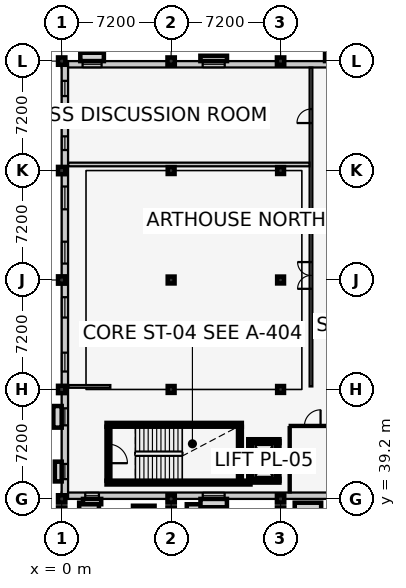
"""IFC4 building model, lengths in metres.
Left out: names, types, materials, properties, quantities, classifications, styles, units other than length and angle.
Written with IfcOpenShell. Run it as: python <this file> out.ifc"""

import sys

from ifc_helpers import new_model, si_unit, direction, frame, frame_2d, origin, origin_2d, place, context, subcontext, project, spatial, rectangle, extrude, element, fill, save


model = new_model("IFC4")
c1 = context("Model", 3, precision=1e-05, world=origin(), true_north=direction((0.0, 1.0)))
c2 = subcontext(c1, "Body", "Model", "MODEL_VIEW")
j1 = project(units=[si_unit("LENGTHUNIT", "METRE"), si_unit("PLANEANGLEUNIT", "RADIAN")], contexts=[c1])
p1 = place(None, origin())
s1 = spatial("IfcSite", under=j1, at=p1, CompositionType="ELEMENT")
p2 = place(p1, origin())
s2 = spatial("IfcBuilding", under=s1, at=p2, CompositionType="ELEMENT")
p3 = place(p2, frame((0.0, 0.0, 9.6)))
s3 = spatial("IfcBuildingStorey", under=s2, at=p3, CompositionType="ELEMENT", Elevation=9.6)
for number, where, z_axis, x_axis in (
    (1, (0.0, 38.4, 0.0), (0.0, 0.0, 1.0), (1.0, 0.0, 0.0)),
    (2, (7.2, 38.4, 0.0), (0.0, 0.0, 1.0), (1.0, 0.0, 0.0)),
    (3, (14.4, 38.4, 0.0), (0.0, 0.0, 1.0), (1.0, 0.0, 0.0)),
    (4, (0.0, 39.2, 0.0), (0.0, 0.0, 1.0), (1.0, 0.0, 0.0)),
    (5, (0.0, 46.4, 0.0), (0.0, 0.0, 1.0), (1.0, 0.0, 0.0)),
    (6, (0.0, 53.6, 0.0), (0.0, 0.0, 1.0), (1.0, 0.0, 0.0)),
    (7, (0.0, 60.8, 0.0), (0.0, 0.0, 1.0), (1.0, 0.0, 0.0)),
    (8, (0.0, 68.0, 0.0), (0.0, 0.0, 1.0), (1.0, 0.0, 0.0)),
    (9, (7.2, 39.2, 0.0), (0.0, 0.0, 1.0), (1.0, 0.0, 0.0)),
):
    element("IfcColumn", number, at=place(p3, frame(where, z_axis=z_axis, x_axis=x_axis)), inside=s3, PredefinedType="COLUMN", context=c2, shape_type="SweptSolid", body=[
        extrude(rectangle(XDim=0.48, YDim=0.48, at=origin_2d()), origin(), (0.0, 0.0, 1.0), 4.2),
    ])
for number, where, z_axis, x_axis in (
    (10, (7.2, 46.4, 0.0), (0.0, 0.0, 1.0), (1.0, 0.0, 0.0)),
    (11, (7.2, 53.6, 0.0), (0.0, 0.0, 1.0), (1.0, 0.0, 0.0)),
    (12, (7.2, 60.8, 0.0), (0.0, 0.0, 1.0), (1.0, 0.0, 0.0)),
):
    element("IfcColumn", number, at=place(p3, frame(where, z_axis=z_axis, x_axis=x_axis)), inside=s3, PredefinedType="COLUMN", context=c2, shape_type="SweptSolid", body=[
        extrude(rectangle(XDim=0.45, YDim=0.45, at=origin_2d()), origin(), (0.0, 0.0, 1.0), 4.2),
    ])
for number, where, z_axis, x_axis in (
    (13, (7.2, 68.0, 0.0), (0.0, 0.0, 1.0), (1.0, 0.0, 0.0)),
    (14, (14.4, 39.2, 0.0), (0.0, 0.0, 1.0), (1.0, 0.0, 0.0)),
):
    element("IfcColumn", number, at=place(p3, frame(where, z_axis=z_axis, x_axis=x_axis)), inside=s3, PredefinedType="COLUMN", context=c2, shape_type="SweptSolid", body=[
        extrude(rectangle(XDim=0.48, YDim=0.48, at=origin_2d()), origin(), (0.0, 0.0, 1.0), 4.2),
    ])
for number, where, z_axis, x_axis in (
    (15, (14.4, 46.4, 0.0), (0.0, 0.0, 1.0), (1.0, 0.0, 0.0)),
    (16, (14.4, 53.6, 0.0), (0.0, 0.0, 1.0), (1.0, 0.0, 0.0)),
    (17, (14.4, 60.8, 0.0), (0.0, 0.0, 1.0), (1.0, 0.0, 0.0)),
):
    element("IfcColumn", number, at=place(p3, frame(where, z_axis=z_axis, x_axis=x_axis)), inside=s3, PredefinedType="COLUMN", context=c2, shape_type="SweptSolid", body=[
        extrude(rectangle(XDim=0.45, YDim=0.45, at=origin_2d()), origin(), (0.0, 0.0, 1.0), 4.2),
    ])
p4 = place(p3, frame((14.4, 68.0, 0.0), z_axis=(0.0, 0.0, 1.0), x_axis=(1.0, 0.0, 0.0)))
e18 = element("IfcColumn", 18, at=p4, inside=s3, PredefinedType="COLUMN", context=c2, shape_type="SweptSolid", body=[
    extrude(rectangle(XDim=0.48, YDim=0.48, at=origin_2d()), origin(), (0.0, 0.0, 1.0), 4.2),
])
p5 = place(p3, frame((36.0, 39.41, 0.0), z_axis=(0.0, 0.0, 1.0), x_axis=(-1.0, 0.0, 0.0)))
e19 = element("IfcWall", 19, at=p5, inside=s3, PredefinedType="SOLIDWALL", context=c2, shape_type="SweptSolid", body=[
    extrude(rectangle(XDim=36.0, YDim=0.42, at=frame_2d((18.0, 0.0))), origin(), (0.0, 0.0, 1.0), 3.245),
])
p6 = place(p5, frame((1.31, 0.0, 0.9)))
e20 = element("IfcOpeningElement", 20, at=p6, cuts=e19, PredefinedType="OPENING", context=c2, shape_type="SweptSolid", body=[
    extrude(rectangle(XDim=1.38, YDim=1.6, at=frame_2d((0.69, 0.8))), frame((0.0, 0.222, 0.0), z_axis=(0.0, -1.0, 0.0), x_axis=(1.0, 0.0, 0.0)), (0.0, 0.0, 1.0), 0.444),
])
p7 = place(p5, frame((25.28, 0.0, 0.9)))
e21 = element("IfcOpeningElement", 21, at=p7, cuts=e19, PredefinedType="OPENING", context=c2, shape_type="SweptSolid", body=[
    extrude(rectangle(XDim=1.44, YDim=1.75, at=frame_2d((0.72, 0.875))), frame((0.0, 0.222, 0.0), z_axis=(0.0, -1.0, 0.0), x_axis=(1.0, 0.0, 0.0)), (0.0, 0.0, 1.0), 0.444),
])
p8 = place(p5, frame((33.55, 0.0, 0.9)))
e22 = element("IfcOpeningElement", 22, at=p8, cuts=e19, PredefinedType="OPENING", context=c2, shape_type="SweptSolid", body=[
    extrude(rectangle(XDim=0.9, YDim=1.35, at=frame_2d((0.45, 0.675))), frame((0.0, 0.222, 0.0), z_axis=(0.0, -1.0, 0.0), x_axis=(1.0, 0.0, 0.0)), (0.0, 0.0, 1.0), 0.444),
])
p9 = place(p3, frame((0.0, 67.79, 0.0), z_axis=(0.0, 0.0, 1.0), x_axis=(1.0, 0.0, 0.0)))
e23 = element("IfcWall", 23, at=p9, inside=s3, PredefinedType="SOLIDWALL", context=c2, shape_type="SweptSolid", body=[
    extrude(rectangle(XDim=36.0, YDim=0.42, at=frame_2d((18.0, 0.0))), origin(), (0.0, 0.0, 1.0), 3.245),
])
p10 = place(p9, frame((1.375, 0.0, 0.9)))
e24 = element("IfcOpeningElement", 24, at=p10, cuts=e23, PredefinedType="OPENING", context=c2, shape_type="SweptSolid", body=[
    extrude(rectangle(XDim=1.25, YDim=1.45, at=frame_2d((0.625, 0.725))), frame((0.0, 0.222, 0.0), z_axis=(0.0, -1.0, 0.0), x_axis=(1.0, 0.0, 0.0)), (0.0, 0.0, 1.0), 0.444),
])
p11 = place(p9, frame((9.275, 0.0, 0.9)))
e25 = element("IfcOpeningElement", 25, at=p11, cuts=e23, PredefinedType="OPENING", context=c2, shape_type="SweptSolid", body=[
    extrude(rectangle(XDim=1.45, YDim=1.45, at=frame_2d((0.725, 0.725))), frame((0.0, 0.222, 0.0), z_axis=(0.0, -1.0, 0.0), x_axis=(1.0, 0.0, 0.0)), (0.0, 0.0, 1.0), 0.444),
])
p12 = place(p9, frame((17.475, 0.0, 0.9)))
e26 = element("IfcOpeningElement", 26, at=p12, cuts=e23, PredefinedType="OPENING", context=c2, shape_type="SweptSolid", body=[
    extrude(rectangle(XDim=1.05, YDim=1.6, at=frame_2d((0.525, 0.8))), frame((0.0, 0.222, 0.0), z_axis=(0.0, -1.0, 0.0), x_axis=(1.0, 0.0, 0.0)), (0.0, 0.0, 1.0), 0.444),
])
p13 = place(p9, frame((25.375, 0.0, 0.9)))
e27 = element("IfcOpeningElement", 27, at=p13, cuts=e23, PredefinedType="OPENING", context=c2, shape_type="SweptSolid", body=[
    extrude(rectangle(XDim=1.25, YDim=1.6, at=frame_2d((0.625, 0.8))), frame((0.0, 0.222, 0.0), z_axis=(0.0, -1.0, 0.0), x_axis=(1.0, 0.0, 0.0)), (0.0, 0.0, 1.0), 0.444),
])
p14 = place(p9, frame((33.25, 0.0, 0.9)))
e28 = element("IfcOpeningElement", 28, at=p14, cuts=e23, PredefinedType="OPENING", context=c2, shape_type="SweptSolid", body=[
    extrude(rectangle(XDim=1.5, YDim=1.6, at=frame_2d((0.75, 0.8))), frame((0.0, 0.222, 0.0), z_axis=(0.0, -1.0, 0.0), x_axis=(1.0, 0.0, 0.0)), (0.0, 0.0, 1.0), 0.444),
])
p15 = place(p3, frame((0.21, 39.2, 0.0), z_axis=(0.0, 0.0, 1.0), x_axis=(0.0, 1.0, 0.0)))
e29 = element("IfcWall", 29, at=p15, inside=s3, PredefinedType="SOLIDWALL", context=c2, shape_type="SweptSolid", body=[
    extrude(rectangle(XDim=28.8, YDim=0.42, at=frame_2d((14.4, 0.0))), origin(), (0.0, 0.0, 1.0), 3.345),
])
p16 = place(p15, frame((1.3, 0.0, 0.9)))
e30 = element("IfcOpeningElement", 30, at=p16, cuts=e29, PredefinedType="OPENING", context=c2, shape_type="SweptSolid", body=[
    extrude(rectangle(XDim=1.0, YDim=1.75, at=frame_2d((0.5, 0.875))), frame((0.0, 0.222, 0.0), z_axis=(0.0, -1.0, 0.0), x_axis=(1.0, 0.0, 0.0)), (0.0, 0.0, 1.0), 0.444),
])
p17 = place(p15, frame((4.84, 0.0, 0.9)))
e31 = element("IfcOpeningElement", 31, at=p17, cuts=e29, PredefinedType="OPENING", context=c2, shape_type="SweptSolid", body=[
    extrude(rectangle(XDim=1.12, YDim=1.75, at=frame_2d((0.56, 0.875))), frame((0.0, 0.222, 0.0), z_axis=(0.0, -1.0, 0.0), x_axis=(1.0, 0.0, 0.0)), (0.0, 0.0, 1.0), 0.444),
])
p18 = place(p15, frame((8.38, 0.0, 0.9)))
e32 = element("IfcOpeningElement", 32, at=p18, cuts=e29, PredefinedType="OPENING", context=c2, shape_type="SweptSolid", body=[
    extrude(rectangle(XDim=1.24, YDim=1.75, at=frame_2d((0.62, 0.875))), frame((0.0, 0.222, 0.0), z_axis=(0.0, -1.0, 0.0), x_axis=(1.0, 0.0, 0.0)), (0.0, 0.0, 1.0), 0.444),
])
p19 = place(p15, frame((11.93, 0.0, 0.9)))
e33 = element("IfcOpeningElement", 33, at=p19, cuts=e29, PredefinedType="OPENING", context=c2, shape_type="SweptSolid", body=[
    extrude(rectangle(XDim=1.34, YDim=1.75, at=frame_2d((0.67, 0.875))), frame((0.0, 0.222, 0.0), z_axis=(0.0, -1.0, 0.0), x_axis=(1.0, 0.0, 0.0)), (0.0, 0.0, 1.0), 0.444),
])
p20 = place(p15, frame((15.48, 0.0, 0.9)))
e34 = element("IfcOpeningElement", 34, at=p20, cuts=e29, PredefinedType="OPENING", context=c2, shape_type="SweptSolid", body=[
    extrude(rectangle(XDim=1.44, YDim=1.75, at=frame_2d((0.72, 0.875))), frame((0.0, 0.222, 0.0), z_axis=(0.0, -1.0, 0.0), x_axis=(1.0, 0.0, 0.0)), (0.0, 0.0, 1.0), 0.444),
])
p21 = place(p15, frame((19.05, 0.0, 0.9)))
e35 = element("IfcOpeningElement", 35, at=p21, cuts=e29, PredefinedType="OPENING", context=c2, shape_type="SweptSolid", body=[
    extrude(rectangle(XDim=1.5, YDim=1.75, at=frame_2d((0.75, 0.875))), frame((0.0, 0.222, 0.0), z_axis=(0.0, -1.0, 0.0), x_axis=(1.0, 0.0, 0.0)), (0.0, 0.0, 1.0), 0.444),
])
p22 = place(p15, frame((22.95, 0.0, 0.9)))
e36 = element("IfcOpeningElement", 36, at=p22, cuts=e29, PredefinedType="OPENING", context=c2, shape_type="SweptSolid", body=[
    extrude(rectangle(XDim=0.9, YDim=1.35, at=frame_2d((0.45, 0.675))), frame((0.0, 0.222, 0.0), z_axis=(0.0, -1.0, 0.0), x_axis=(1.0, 0.0, 0.0)), (0.0, 0.0, 1.0), 0.444),
])
p23 = place(p15, frame((26.5, 0.0, 0.9)))
e37 = element("IfcOpeningElement", 37, at=p23, cuts=e29, PredefinedType="OPENING", context=c2, shape_type="SweptSolid", body=[
    extrude(rectangle(XDim=1.0, YDim=1.35, at=frame_2d((0.5, 0.675))), frame((0.0, 0.222, 0.0), z_axis=(0.0, -1.0, 0.0), x_axis=(1.0, 0.0, 0.0)), (0.0, 0.0, 1.0), 0.444),
])
p24 = place(p3, frame((2.95, 40.275, 0.0), z_axis=(0.0, 0.0, 1.0), x_axis=(1.0, 0.0, 0.0)))
e38 = element("IfcWall", 38, at=p24, inside=s3, PredefinedType="SHEAR", context=c2, shape_type="SweptSolid", body=[
    extrude(rectangle(XDim=9.47, YDim=0.25, at=frame_2d((4.735, 0.0))), origin(), (0.0, 0.0, 1.0), 3.95),
])
p25 = place(p3, frame((11.85, 44.075, 0.0), z_axis=(0.0, 0.0, 1.0), x_axis=(-1.0, 0.0, 0.0)))
e39 = element("IfcWall", 39, at=p25, inside=s3, PredefinedType="SHEAR", context=c2, shape_type="SweptSolid", body=[
    extrude(rectangle(XDim=8.9, YDim=0.25, at=frame_2d((4.45, 0.0))), origin(), (0.0, 0.0, 1.0), 3.95),
])
p26 = place(p3, frame((3.075, 43.95, 0.0), z_axis=(0.0, 0.0, 1.0), x_axis=(0.0, -1.0, 0.0)))
e40 = element("IfcWall", 40, at=p26, inside=s3, PredefinedType="SHEAR", context=c2, shape_type="SweptSolid", body=[
    extrude(rectangle(XDim=3.55, YDim=0.25, at=frame_2d((1.775, 0.0))), origin(), (0.0, 0.0, 1.0), 3.95),
])
p27 = place(p26, frame((1.15, 0.0, 0.0)))
e41 = element("IfcOpeningElement", 41, at=p27, cuts=e40, PredefinedType="OPENING", context=c2, shape_type="SweptSolid", body=[
    extrude(rectangle(XDim=1.25, YDim=2.15, at=frame_2d((0.625, 1.075))), frame((0.0, 0.137, 0.0), z_axis=(0.0, -1.0, 0.0), x_axis=(1.0, 0.0, 0.0)), (0.0, 0.0, 1.0), 0.274),
])
p28 = place(p3, frame((11.725, 40.4, 0.0), z_axis=(0.0, 0.0, 1.0), x_axis=(0.0, 1.0, 0.0)))
e42 = element("IfcWall", 42, at=p28, inside=s3, PredefinedType="SHEAR", context=c2, shape_type="SweptSolid", body=[
    extrude(rectangle(XDim=3.55, YDim=0.25, at=frame_2d((1.775, 0.0))), origin(), (0.0, 0.0, 1.0), 3.95),
])
p29 = place(p3, frame((12.275, 40.4, 0.0), z_axis=(0.0, 0.0, 1.0), x_axis=(1.0, 0.0, 0.0)))
e43 = element("IfcWall", 43, at=p29, inside=s3, PredefinedType="SHEAR", context=c2, shape_type="SweptSolid", body=[
    extrude(rectangle(XDim=2.05, YDim=0.25, at=frame_2d((1.025, 0.0))), origin(), (0.0, 0.0, 1.0), 3.95),
])
p30 = place(p3, frame((14.325, 43.0, 0.0), z_axis=(0.0, 0.0, 1.0), x_axis=(-1.0, 0.0, 0.0)))
e44 = element("IfcWall", 44, at=p30, inside=s3, PredefinedType="SHEAR", context=c2, shape_type="SweptSolid", body=[
    extrude(rectangle(XDim=2.05, YDim=0.25, at=frame_2d((1.025, 0.0))), origin(), (0.0, 0.0, 1.0), 3.95),
])
p31 = place(p30, frame((0.55, 0.0, 0.0)))
e45 = element("IfcOpeningElement", 45, at=p31, cuts=e44, PredefinedType="OPENING", context=c2, shape_type="SweptSolid", body=[
    extrude(rectangle(XDim=0.95, YDim=2.1, at=frame_2d((0.475, 1.05))), frame((0.0, 0.137, 0.0), z_axis=(0.0, -1.0, 0.0), x_axis=(1.0, 0.0, 0.0)), (0.0, 0.0, 1.0), 0.274),
])
for number, where, z_axis, x_axis in (
    (46, (12.4, 43.0, 0.0), (0.0, 0.0, 1.0), (0.0, -1.0, 0.0)),
    (47, (14.2, 40.4, 0.0), (0.0, 0.0, 1.0), (0.0, 1.0, 0.0)),
):
    element("IfcWall", number, at=place(p3, frame(where, z_axis=z_axis, x_axis=x_axis)), inside=s3, PredefinedType="SHEAR", context=c2, shape_type="SweptSolid", body=[
        extrude(rectangle(XDim=2.6, YDim=0.25, at=frame_2d((1.3, 0.0))), origin(), (0.0, 0.0, 1.0), 3.95),
    ])
p32 = place(p3, frame((0.43, 46.6, 0.0), z_axis=(0.0, 0.0, 1.0), x_axis=(1.0, 0.0, 0.0)))
e48 = element("IfcWall", 48, at=p32, inside=s3, PredefinedType="PARTITIONING", context=c2, shape_type="SweptSolid", body=[
    extrude(rectangle(XDim=2.77, YDim=0.18, at=frame_2d((1.385, 0.0))), origin(), (0.0, 0.0, 1.0), 3.225),
])
p33 = place(p3, frame((16.4, 46.6, 0.0), z_axis=(0.0, 0.0, 1.0), x_axis=(0.0, 1.0, 0.0)))
e49 = element("IfcWall", 49, at=p33, inside=s3, PredefinedType="PARTITIONING", context=c2, shape_type="SweptSolid", body=[
    extrude(rectangle(XDim=20.97, YDim=0.18, at=frame_2d((10.485, 0.0))), origin(), (0.0, 0.0, 1.0), 3.95),
])
p34 = place(p33, frame((6.42, 0.0, 0.0)))
e50 = element("IfcOpeningElement", 50, at=p34, cuts=e49, PredefinedType="OPENING", context=c2, shape_type="SweptSolid", body=[
    extrude(rectangle(XDim=1.76, YDim=2.3, at=frame_2d((0.88, 1.15))), frame((0.0, 0.102, 0.0), z_axis=(0.0, -1.0, 0.0), x_axis=(1.0, 0.0, 0.0)), (0.0, 0.0, 1.0), 0.204),
])
p35 = place(p33, frame((17.325, 0.0, 0.0)))
e51 = element("IfcOpeningElement", 51, at=p35, cuts=e49, PredefinedType="OPENING", context=c2, shape_type="SweptSolid", body=[
    extrude(rectangle(XDim=0.92, YDim=2.08, at=frame_2d((0.46, 1.04))), frame((0.0, 0.102, 0.0), z_axis=(0.0, -1.0, 0.0), x_axis=(1.0, 0.0, 0.0)), (0.0, 0.0, 1.0), 0.204),
])
p36 = place(p3, frame((0.43, 61.2, 0.0), z_axis=(0.0, 0.0, 1.0), x_axis=(1.0, 0.0, 0.0)))
e52 = element("IfcWall", 52, at=p36, inside=s3, PredefinedType="PARTITIONING", context=c2, shape_type="SweptSolid", body=[
    extrude(rectangle(XDim=15.87, YDim=0.24, at=frame_2d((7.935, 0.0))), origin(), (0.0, 0.0, 1.0), 3.96),
])
p37 = place(p3, frame((15.0, 44.0, 0.0), z_axis=(0.0, 0.0, 1.0), x_axis=(1.0, 0.0, 0.0)))
e53 = element("IfcWall", 53, at=p37, inside=s3, PredefinedType="PARTITIONING", context=c2, shape_type="SweptSolid", body=[
    extrude(rectangle(XDim=3.0, YDim=0.14, at=frame_2d((1.5, 0.0))), origin(), (0.0, 0.0, 1.0), 3.95),
])
p38 = place(p37, frame((0.97, 0.0, 0.0)))
e54 = element("IfcOpeningElement", 54, at=p38, cuts=e53, PredefinedType="OPENING", context=c2, shape_type="SweptSolid", body=[
    extrude(rectangle(XDim=1.06, YDim=2.1, at=frame_2d((0.53, 1.05))), frame((0.0, 0.082, 0.0), z_axis=(0.0, -1.0, 0.0), x_axis=(1.0, 0.0, 0.0)), (0.0, 0.0, 1.0), 0.164),
])
p39 = place(p3, frame((15.0, 39.63, 0.0), z_axis=(0.0, 0.0, 1.0), x_axis=(0.0, 1.0, 0.0)))
e55 = element("IfcWall", 55, at=p39, inside=s3, PredefinedType="PARTITIONING", context=c2, shape_type="SweptSolid", body=[
    extrude(rectangle(XDim=4.29, YDim=0.14, at=frame_2d((2.145, 0.0))), origin(), (0.0, 0.0, 1.0), 3.95),
])
p40 = place(p7, origin())
e56 = element("IfcWindow", 56, at=p40, inside=s3, PartitioningType="SINGLE_PANEL", PredefinedType="WINDOW", context=c2, shape_type="SweptSolid", body=[
    extrude(rectangle(XDim=1.44, YDim=1.75, at=frame_2d((0.72, 0.875))), frame((0.0, 0.03, 0.0), z_axis=(0.0, -1.0, 0.0), x_axis=(1.0, 0.0, 0.0)), (0.0, 0.0, 1.0), 0.06),
])
fill(e21, e56)
p41 = place(p8, origin())
e57 = element("IfcWindow", 57, at=p41, inside=s3, PartitioningType="SINGLE_PANEL", PredefinedType="WINDOW", context=c2, shape_type="SweptSolid", body=[
    extrude(rectangle(XDim=0.9, YDim=1.35, at=frame_2d((0.45, 0.675))), frame((0.0, 0.03, 0.0), z_axis=(0.0, -1.0, 0.0), x_axis=(1.0, 0.0, 0.0)), (0.0, 0.0, 1.0), 0.06),
])
fill(e22, e57)
p42 = place(p10, origin())
e58 = element("IfcWindow", 58, at=p42, inside=s3, PartitioningType="SINGLE_PANEL", PredefinedType="WINDOW", context=c2, shape_type="SweptSolid", body=[
    extrude(rectangle(XDim=1.25, YDim=1.45, at=frame_2d((0.625, 0.725))), frame((0.0, 0.03, 0.0), z_axis=(0.0, -1.0, 0.0), x_axis=(1.0, 0.0, 0.0)), (0.0, 0.0, 1.0), 0.06),
])
fill(e24, e58)
p43 = place(p11, origin())
e59 = element("IfcWindow", 59, at=p43, inside=s3, PartitioningType="SINGLE_PANEL", PredefinedType="WINDOW", context=c2, shape_type="SweptSolid", body=[
    extrude(rectangle(XDim=1.45, YDim=1.45, at=frame_2d((0.725, 0.725))), frame((0.0, 0.03, 0.0), z_axis=(0.0, -1.0, 0.0), x_axis=(1.0, 0.0, 0.0)), (0.0, 0.0, 1.0), 0.06),
])
fill(e25, e59)
p44 = place(p16, origin())
e60 = element("IfcWindow", 60, at=p44, inside=s3, PartitioningType="SINGLE_PANEL", PredefinedType="WINDOW", context=c2, shape_type="SweptSolid", body=[
    extrude(rectangle(XDim=1.0, YDim=1.75, at=frame_2d((0.5, 0.875))), frame((0.0, 0.03, 0.0), z_axis=(0.0, -1.0, 0.0), x_axis=(1.0, 0.0, 0.0)), (0.0, 0.0, 1.0), 0.06),
])
fill(e30, e60)
p45 = place(p17, origin())
e61 = element("IfcWindow", 61, at=p45, inside=s3, PartitioningType="SINGLE_PANEL", PredefinedType="WINDOW", context=c2, shape_type="SweptSolid", body=[
    extrude(rectangle(XDim=1.12, YDim=1.75, at=frame_2d((0.56, 0.875))), frame((0.0, 0.03, 0.0), z_axis=(0.0, -1.0, 0.0), x_axis=(1.0, 0.0, 0.0)), (0.0, 0.0, 1.0), 0.06),
])
fill(e31, e61)
p46 = place(p18, origin())
e62 = element("IfcWindow", 62, at=p46, inside=s3, PartitioningType="SINGLE_PANEL", PredefinedType="WINDOW", context=c2, shape_type="SweptSolid", body=[
    extrude(rectangle(XDim=1.24, YDim=1.75, at=frame_2d((0.62, 0.875))), frame((0.0, 0.03, 0.0), z_axis=(0.0, -1.0, 0.0), x_axis=(1.0, 0.0, 0.0)), (0.0, 0.0, 1.0), 0.06),
])
fill(e32, e62)
p47 = place(p19, origin())
e63 = element("IfcWindow", 63, at=p47, inside=s3, PartitioningType="SINGLE_PANEL", PredefinedType="WINDOW", context=c2, shape_type="SweptSolid", body=[
    extrude(rectangle(XDim=1.34, YDim=1.75, at=frame_2d((0.67, 0.875))), frame((0.0, 0.03, 0.0), z_axis=(0.0, -1.0, 0.0), x_axis=(1.0, 0.0, 0.0)), (0.0, 0.0, 1.0), 0.06),
])
fill(e33, e63)
p48 = place(p20, origin())
e64 = element("IfcWindow", 64, at=p48, inside=s3, PartitioningType="SINGLE_PANEL", PredefinedType="WINDOW", context=c2, shape_type="SweptSolid", body=[
    extrude(rectangle(XDim=1.44, YDim=1.75, at=frame_2d((0.72, 0.875))), frame((0.0, 0.03, 0.0), z_axis=(0.0, -1.0, 0.0), x_axis=(1.0, 0.0, 0.0)), (0.0, 0.0, 1.0), 0.06),
])
fill(e34, e64)
p49 = place(p21, origin())
e65 = element("IfcWindow", 65, at=p49, inside=s3, PartitioningType="SINGLE_PANEL", PredefinedType="WINDOW", context=c2, shape_type="SweptSolid", body=[
    extrude(rectangle(XDim=1.5, YDim=1.75, at=frame_2d((0.75, 0.875))), frame((0.0, 0.03, 0.0), z_axis=(0.0, -1.0, 0.0), x_axis=(1.0, 0.0, 0.0)), (0.0, 0.0, 1.0), 0.06),
])
fill(e35, e65)
p50 = place(p22, origin())
e66 = element("IfcWindow", 66, at=p50, inside=s3, PartitioningType="SINGLE_PANEL", PredefinedType="WINDOW", context=c2, shape_type="SweptSolid", body=[
    extrude(rectangle(XDim=0.9, YDim=1.35, at=frame_2d((0.45, 0.675))), frame((0.0, 0.03, 0.0), z_axis=(0.0, -1.0, 0.0), x_axis=(1.0, 0.0, 0.0)), (0.0, 0.0, 1.0), 0.06),
])
fill(e36, e66)
p51 = place(p23, origin())
e67 = element("IfcWindow", 67, at=p51, inside=s3, PartitioningType="SINGLE_PANEL", PredefinedType="WINDOW", context=c2, shape_type="SweptSolid", body=[
    extrude(rectangle(XDim=1.0, YDim=1.35, at=frame_2d((0.5, 0.675))), frame((0.0, 0.03, 0.0), z_axis=(0.0, -1.0, 0.0), x_axis=(1.0, 0.0, 0.0)), (0.0, 0.0, 1.0), 0.06),
])
fill(e37, e67)
p52 = place(p27, origin())
e68 = element("IfcDoor", 68, at=p52, inside=s3, OperationType="SINGLE_SWING_RIGHT", PredefinedType="DOOR", context=c2, shape_type="SweptSolid", body=[
    extrude(rectangle(XDim=1.25, YDim=2.15, at=frame_2d((0.625, 1.075))), frame((0.0, 0.025, 0.0), z_axis=(0.0, -1.0, 0.0), x_axis=(1.0, 0.0, 0.0)), (0.0, 0.0, 1.0), 0.05),
])
fill(e41, e68)
p53 = place(p31, origin())
e69 = element("IfcDoor", 69, at=p53, inside=s3, OperationType="SLIDING_TO_LEFT", PredefinedType="DOOR", context=c2, shape_type="SweptSolid", body=[
    extrude(rectangle(XDim=0.95, YDim=2.1, at=frame_2d((0.475, 1.05))), frame((0.0, 0.025, 0.0), z_axis=(0.0, -1.0, 0.0), x_axis=(1.0, 0.0, 0.0)), (0.0, 0.0, 1.0), 0.05),
])
fill(e45, e69)
p54 = place(p34, origin())
e70 = element("IfcDoor", 70, at=p54, inside=s3, OperationType="DOUBLE_DOOR_SINGLE_SWING", PredefinedType="DOOR", context=c2, shape_type="SweptSolid", body=[
    extrude(rectangle(XDim=1.76, YDim=2.3, at=frame_2d((0.88, 1.15))), frame((0.0, 0.025, 0.0), z_axis=(0.0, -1.0, 0.0), x_axis=(1.0, 0.0, 0.0)), (0.0, 0.0, 1.0), 0.05),
])
fill(e50, e70)
p55 = place(p35, origin())
e71 = element("IfcDoor", 71, at=p55, inside=s3, OperationType="SINGLE_SWING_LEFT", PredefinedType="DOOR", context=c2, shape_type="SweptSolid", body=[
    extrude(rectangle(XDim=0.92, YDim=2.08, at=frame_2d((0.46, 1.04))), frame((0.0, 0.025, 0.0), z_axis=(0.0, -1.0, 0.0), x_axis=(1.0, 0.0, 0.0)), (0.0, 0.0, 1.0), 0.05),
])
fill(e51, e71)
p56 = place(p38, origin())
e72 = element("IfcDoor", 72, at=p56, inside=s3, OperationType="SINGLE_SWING_RIGHT", PredefinedType="DOOR", context=c2, shape_type="SweptSolid", body=[
    extrude(rectangle(XDim=1.06, YDim=2.1, at=frame_2d((0.53, 1.05))), frame((0.0, 0.025, 0.0), z_axis=(0.0, -1.0, 0.0), x_axis=(1.0, 0.0, 0.0)), (0.0, 0.0, 1.0), 0.05),
])
fill(e54, e72)
save(model, sys.argv[1])
